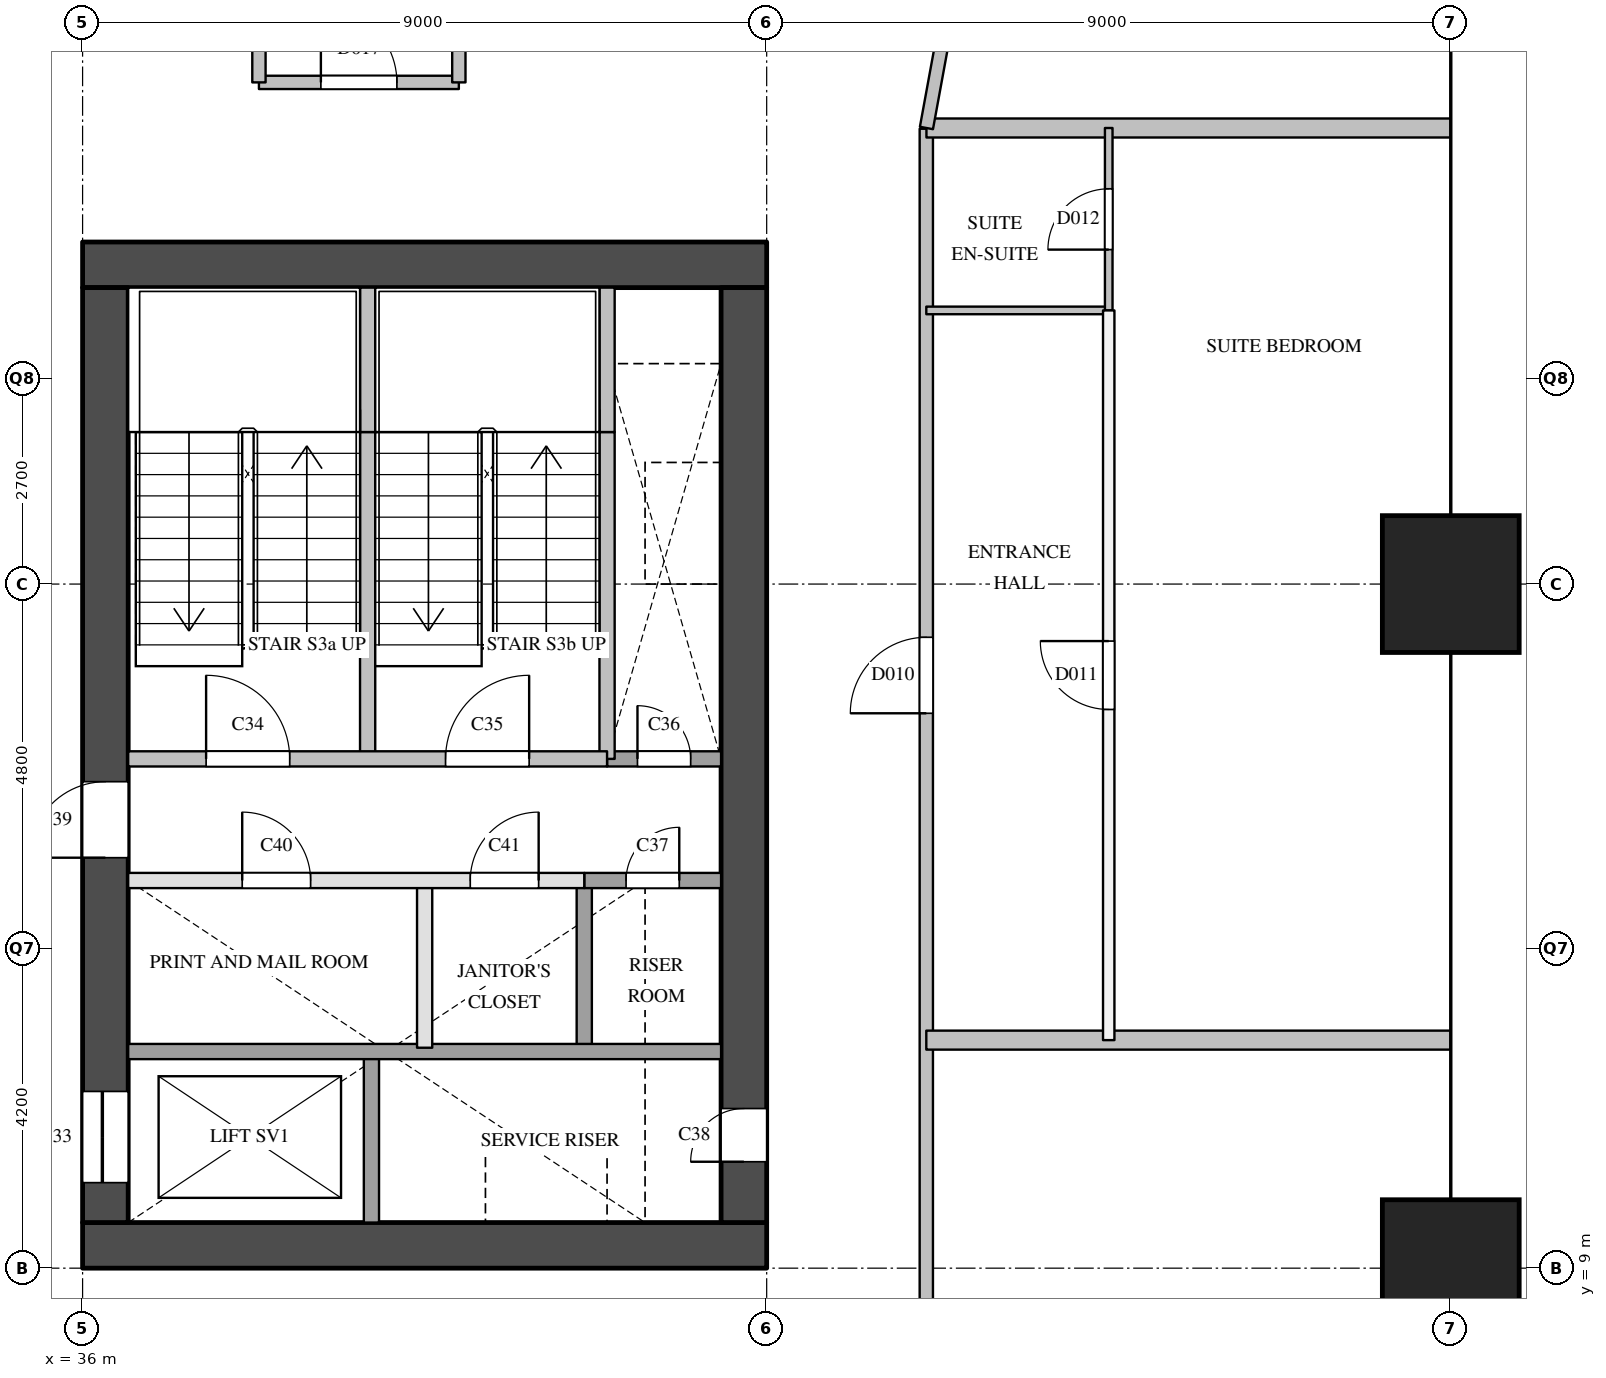
"""IFC4 building model, lengths in metres.
Left out: names, types, materials, properties, quantities, classifications, styles, units other than length and angle.
Written with IfcOpenShell. Run it as: python <this file> out.ifc"""

import sys

from ifc_helpers import new_model, si_unit, direction, frame, frame_2d, origin, origin_2d, place, context, subcontext, project, spatial, rectangle, extrude, element, fill, save


model = new_model("IFC4")
c1 = context("Model", 3, precision=1e-05, world=origin(), true_north=direction((0.0, 1.0)))
c2 = subcontext(c1, "Body", "Model", "MODEL_VIEW")
j1 = project(units=[si_unit("LENGTHUNIT", "METRE"), si_unit("PLANEANGLEUNIT", "RADIAN")], contexts=[c1])
p1 = place(None, origin())
s1 = spatial("IfcSite", under=j1, at=p1, CompositionType="ELEMENT")
p2 = place(p1, origin())
s2 = spatial("IfcBuilding", under=s1, at=p2, CompositionType="ELEMENT")
p3 = place(p2, frame((0.0, 0.0, 46.2)))
s3 = spatial("IfcBuildingStorey", under=s2, at=p3, CompositionType="ELEMENT", Elevation=46.2)
for number, where, z_axis, x_axis in (
    (1, (54.0, 9.0, 0.0), (0.0, 0.0, 1.0), (1.0, 0.0, 0.0)),
    (2, (54.0, 18.0, 0.0), (0.0, 0.0, 1.0), (1.0, 0.0, 0.0)),
):
    element("IfcColumn", number, at=place(p3, frame(where, z_axis=z_axis, x_axis=x_axis)), inside=s3, PredefinedType="COLUMN", context=c2, shape_type="SweptSolid", body=[
        extrude(rectangle(XDim=1.8, YDim=1.8, at=origin_2d()), origin(), (0.0, 0.0, 1.0), 3.8),
    ])
for number, where, z_axis, x_axis in (
    (3, (36.0, 9.3, 0.0), (0.0, 0.0, 1.0), (1.0, 0.0, 0.0)),
    (4, (36.0, 22.2, 0.0), (0.0, 0.0, 1.0), (1.0, 0.0, 0.0)),
):
    element("IfcWall", number, at=place(p3, frame(where, z_axis=z_axis, x_axis=x_axis)), inside=s3, PredefinedType="SHEAR", context=c2, shape_type="SweptSolid", body=[
        extrude(rectangle(XDim=9.0, YDim=0.6, at=frame_2d((4.5, 0.0))), origin(), (0.0, 0.0, 1.0), 3.5),
    ])
p4 = place(p3, frame((36.3, 9.6, 0.0), z_axis=(0.0, 0.0, 1.0), x_axis=(0.0, 1.0, 0.0)))
e5 = element("IfcWall", 5, at=p4, inside=s3, PredefinedType="SHEAR", context=c2, shape_type="SweptSolid", body=[
    extrude(rectangle(XDim=12.3, YDim=0.6, at=frame_2d((6.15, 0.0))), origin(), (0.0, 0.0, 1.0), 3.5),
])
p5 = place(p4, frame((0.525, 0.0, 0.0)))
e6 = element("IfcOpeningElement", 6, at=p5, cuts=e5, PredefinedType="OPENING", context=c2, shape_type="SweptSolid", body=[
    extrude(rectangle(XDim=1.2, YDim=2.1, at=frame_2d((0.6, 1.05))), frame((0.0, 0.31, 0.0), z_axis=(0.0, -1.0, 0.0), x_axis=(1.0, 0.0, 0.0)), (0.0, 0.0, 1.0), 0.62),
])
p6 = place(p4, frame((4.8, 0.0, 0.0)))
e7 = element("IfcOpeningElement", 7, at=p6, cuts=e5, PredefinedType="OPENING", context=c2, shape_type="SweptSolid", body=[
    extrude(rectangle(XDim=1.0, YDim=2.1, at=frame_2d((0.5, 1.05))), frame((0.0, 0.31, 0.0), z_axis=(0.0, -1.0, 0.0), x_axis=(1.0, 0.0, 0.0)), (0.0, 0.0, 1.0), 0.62),
])
p7 = place(p3, frame((44.7, 9.6, 0.0), z_axis=(0.0, 0.0, 1.0), x_axis=(0.0, 1.0, 0.0)))
e8 = element("IfcWall", 8, at=p7, inside=s3, PredefinedType="SHEAR", context=c2, shape_type="SweptSolid", body=[
    extrude(rectangle(XDim=12.3, YDim=0.6, at=frame_2d((6.15, 0.0))), origin(), (0.0, 0.0, 1.0), 3.5),
])
p8 = place(p7, frame((0.8, 0.0, 0.0)))
e9 = element("IfcOpeningElement", 9, at=p8, cuts=e8, PredefinedType="OPENING", context=c2, shape_type="SweptSolid", body=[
    extrude(rectangle(XDim=0.7, YDim=2.1, at=frame_2d((0.35, 1.05))), frame((0.0, 0.31, 0.0), z_axis=(0.0, -1.0, 0.0), x_axis=(1.0, 0.0, 0.0)), (0.0, 0.0, 1.0), 0.62),
])
p9 = place(p3, frame((39.75, 15.7, 0.0), z_axis=(0.0, 0.0, 1.0), x_axis=(0.0, 1.0, 0.0)))
e10 = element("IfcWall", 10, at=p9, inside=s3, PredefinedType="SOLIDWALL", context=c2, shape_type="SweptSolid", body=[
    extrude(rectangle(XDim=4.3, YDim=0.2, at=frame_2d((2.15, 0.0))), origin(), (0.0, 0.0, 1.0), 3.5),
])
p10 = place(p3, frame((39.75, 20.0, 0.0), z_axis=(0.0, 0.0, 1.0), x_axis=(0.0, 1.0, 0.0)))
e11 = element("IfcWall", 11, at=p10, inside=s3, PredefinedType="SOLIDWALL", context=c2, shape_type="SweptSolid", body=[
    extrude(rectangle(XDim=1.9, YDim=0.2, at=frame_2d((0.95, 0.0))), origin(), (0.0, 0.0, 1.0), 3.5),
])
p11 = place(p3, frame((39.8, 9.6, 0.0), z_axis=(0.0, 0.0, 1.0), x_axis=(0.0, 1.0, 0.0)))
e12 = element("IfcWall", 12, at=p11, inside=s3, PredefinedType="SOLIDWALL", context=c2, shape_type="SweptSolid", body=[
    extrude(rectangle(XDim=2.3, YDim=0.2, at=frame_2d((1.15, 0.0))), origin(), (0.0, 0.0, 1.0), 3.5),
])
p12 = place(p3, frame((40.5, 11.9, 0.0), z_axis=(0.0, 0.0, 1.0), x_axis=(0.0, 1.0, 0.0)))
e13 = element("IfcWall", 13, at=p12, inside=s3, PredefinedType="PARTITIONING", context=c2, shape_type="SweptSolid", body=[
    extrude(rectangle(XDim=2.2, YDim=0.2, at=frame_2d((1.1, 0.0))), origin(), (0.0, 0.0, 1.0), 3.5),
])
p13 = place(p3, frame((42.6, 11.9, 0.0), z_axis=(0.0, 0.0, 1.0), x_axis=(0.0, 1.0, 0.0)))
e14 = element("IfcWall", 14, at=p13, inside=s3, PredefinedType="SOLIDWALL", context=c2, shape_type="SweptSolid", body=[
    extrude(rectangle(XDim=2.2, YDim=0.2, at=frame_2d((1.1, 0.0))), origin(), (0.0, 0.0, 1.0), 3.5),
])
p14 = place(p3, frame((42.9, 15.7, 0.0), z_axis=(0.0, 0.0, 1.0), x_axis=(0.0, 1.0, 0.0)))
e15 = element("IfcWall", 15, at=p14, inside=s3, PredefinedType="SOLIDWALL", context=c2, shape_type="SweptSolid", body=[
    extrude(rectangle(XDim=4.3, YDim=0.2, at=frame_2d((2.15, 0.0))), origin(), (0.0, 0.0, 1.0), 3.5),
])
p15 = place(p3, frame((42.9, 20.0, 0.0), z_axis=(0.0, 0.0, 1.0), x_axis=(0.0, 1.0, 0.0)))
e16 = element("IfcWall", 16, at=p15, inside=s3, PredefinedType="SOLIDWALL", context=c2, shape_type="SweptSolid", body=[
    extrude(rectangle(XDim=1.9, YDim=0.2, at=frame_2d((0.95, 0.0))), origin(), (0.0, 0.0, 1.0), 3.5),
])
p16 = place(p3, frame((36.6, 11.85, 0.0), z_axis=(0.0, 0.0, 1.0), x_axis=(1.0, 0.0, 0.0)))
e17 = element("IfcWall", 17, at=p16, inside=s3, PredefinedType="SOLIDWALL", context=c2, shape_type="SweptSolid", body=[
    extrude(rectangle(XDim=7.8, YDim=0.2, at=frame_2d((3.9, 0.0))), origin(), (0.0, 0.0, 1.0), 3.5),
])
p17 = place(p3, frame((36.6, 14.1, 0.0), z_axis=(0.0, 0.0, 1.0), x_axis=(1.0, 0.0, 0.0)))
e18 = element("IfcWall", 18, at=p17, inside=s3, PredefinedType="PARTITIONING", context=c2, shape_type="SweptSolid", body=[
    extrude(rectangle(XDim=6.0, YDim=0.2, at=frame_2d((3.0, 0.0))), origin(), (0.0, 0.0, 1.0), 3.5),
])
p18 = place(p17, frame((1.5, 0.0, 0.0)))
e19 = element("IfcOpeningElement", 19, at=p18, cuts=e18, PredefinedType="OPENING", context=c2, shape_type="SweptSolid", body=[
    extrude(rectangle(XDim=0.9, YDim=2.1, at=frame_2d((0.45, 1.05))), frame((0.0, 0.11, 0.0), z_axis=(0.0, -1.0, 0.0), x_axis=(1.0, 0.0, 0.0)), (0.0, 0.0, 1.0), 0.22),
])
p19 = place(p17, frame((4.5, 0.0, 0.0)))
e20 = element("IfcOpeningElement", 20, at=p19, cuts=e18, PredefinedType="OPENING", context=c2, shape_type="SweptSolid", body=[
    extrude(rectangle(XDim=0.9, YDim=2.1, at=frame_2d((0.45, 1.05))), frame((0.0, 0.11, 0.0), z_axis=(0.0, -1.0, 0.0), x_axis=(1.0, 0.0, 0.0)), (0.0, 0.0, 1.0), 0.22),
])
p20 = place(p3, frame((42.6, 14.1, 0.0), z_axis=(0.0, 0.0, 1.0), x_axis=(1.0, 0.0, 0.0)))
e21 = element("IfcWall", 21, at=p20, inside=s3, PredefinedType="SOLIDWALL", context=c2, shape_type="SweptSolid", body=[
    extrude(rectangle(XDim=1.8, YDim=0.2, at=frame_2d((0.9, 0.0))), origin(), (0.0, 0.0, 1.0), 3.5),
])
p21 = place(p20, frame((0.55, 0.0, 0.0)))
e22 = element("IfcOpeningElement", 22, at=p21, cuts=e21, PredefinedType="OPENING", context=c2, shape_type="SweptSolid", body=[
    extrude(rectangle(XDim=0.7, YDim=2.1, at=frame_2d((0.35, 1.05))), frame((0.0, 0.11, 0.0), z_axis=(0.0, -1.0, 0.0), x_axis=(1.0, 0.0, 0.0)), (0.0, 0.0, 1.0), 0.22),
])
p22 = place(p3, frame((42.9, 15.7, 0.0), z_axis=(0.0, 0.0, 1.0), x_axis=(1.0, 0.0, 0.0)))
e23 = element("IfcWall", 23, at=p22, inside=s3, PredefinedType="SOLIDWALL", context=c2, shape_type="SweptSolid", body=[
    extrude(rectangle(XDim=1.5, YDim=0.2, at=frame_2d((0.75, 0.0))), origin(), (0.0, 0.0, 1.0), 3.5),
])
p23 = place(p22, frame((0.4, 0.0, 0.0)))
e24 = element("IfcOpeningElement", 24, at=p23, cuts=e23, PredefinedType="OPENING", context=c2, shape_type="SweptSolid", body=[
    extrude(rectangle(XDim=0.7, YDim=2.1, at=frame_2d((0.35, 1.05))), frame((0.0, 0.11, 0.0), z_axis=(0.0, -1.0, 0.0), x_axis=(1.0, 0.0, 0.0)), (0.0, 0.0, 1.0), 0.22),
])
p24 = place(p3, frame((36.6, 15.7, 0.0), z_axis=(0.0, 0.0, 1.0), x_axis=(1.0, 0.0, 0.0)))
e25 = element("IfcWall", 25, at=p24, inside=s3, PredefinedType="SOLIDWALL", context=c2, shape_type="SweptSolid", body=[
    extrude(rectangle(XDim=6.3, YDim=0.2, at=frame_2d((3.15, 0.0))), origin(), (0.0, 0.0, 1.0), 3.5),
])
p25 = place(p24, frame((1.025, 0.0, 0.0)))
e26 = element("IfcOpeningElement", 26, at=p25, cuts=e25, PredefinedType="OPENING", context=c2, shape_type="SweptSolid", body=[
    extrude(rectangle(XDim=1.1, YDim=2.1, at=frame_2d((0.55, 1.05))), frame((0.0, 0.11, 0.0), z_axis=(0.0, -1.0, 0.0), x_axis=(1.0, 0.0, 0.0)), (0.0, 0.0, 1.0), 0.22),
])
p26 = place(p24, frame((4.175, 0.0, 0.0)))
e27 = element("IfcOpeningElement", 27, at=p26, cuts=e25, PredefinedType="OPENING", context=c2, shape_type="SweptSolid", body=[
    extrude(rectangle(XDim=1.1, YDim=2.1, at=frame_2d((0.55, 1.05))), frame((0.0, 0.11, 0.0), z_axis=(0.0, -1.0, 0.0), x_axis=(1.0, 0.0, 0.0)), (0.0, 0.0, 1.0), 0.22),
])
p27 = place(p3, frame((38.32, 24.6, 0.0), z_axis=(0.0, 0.0, 1.0), x_axis=(1.0, 0.0, 0.0)))
e28 = element("IfcWall", 28, at=p27, inside=s3, PredefinedType="PARTITIONING", context=c2, shape_type="SweptSolid", body=[
    extrude(rectangle(XDim=2.63, YDim=0.175, at=frame_2d((1.315, 0.0))), origin(), (0.0, 0.0, 1.0), 3.5),
])
p28 = place(p27, frame((0.815, 0.0, 0.0)))
e29 = element("IfcOpeningElement", 29, at=p28, cuts=e28, PredefinedType="OPENING", context=c2, shape_type="SweptSolid", body=[
    extrude(rectangle(XDim=1.0, YDim=2.1, at=frame_2d((0.5, 1.05))), frame((0.0, 0.097, 0.0), z_axis=(0.0, -1.0, 0.0), x_axis=(1.0, 0.0, 0.0)), (0.0, 0.0, 1.0), 0.195),
])
for number, where, z_axis, x_axis in (
    (30, (38.32, 24.6, 0.0), (0.0, 0.0, 1.0), (0.0, 1.0, 0.0)),
    (31, (40.95, 24.6, 0.0), (0.0, 0.0, 1.0), (0.0, 1.0, 0.0)),
):
    element("IfcWall", number, at=place(p3, frame(where, z_axis=z_axis, x_axis=x_axis)), inside=s3, PredefinedType="PARTITIONING", context=c2, shape_type="SweptSolid", body=[
        extrude(rectangle(XDim=1.8, YDim=0.175, at=frame_2d((0.9, 0.0))), origin(), (0.0, 0.0, 1.0), 3.5),
    ])
p29 = place(p3, frame((47.1, 6.9, 0.0), z_axis=(0.0, 0.0, 1.0), x_axis=(0.0, 1.0, 0.0)))
e32 = element("IfcWall", 32, at=p29, inside=s3, PredefinedType="PARTITIONING", context=c2, shape_type="SweptSolid", body=[
    extrude(rectangle(XDim=17.09, YDim=0.175, at=frame_2d((8.545, 0.0))), origin(), (0.0, 0.0, 1.0), 3.5),
])
p30 = place(p29, frame((9.4, 0.0, 0.0)))
e33 = element("IfcOpeningElement", 33, at=p30, cuts=e32, PredefinedType="OPENING", context=c2, shape_type="SweptSolid", body=[
    extrude(rectangle(XDim=1.0, YDim=2.1, at=frame_2d((0.5, 1.05))), frame((0.0, 0.097, 0.0), z_axis=(0.0, -1.0, 0.0), x_axis=(1.0, 0.0, 0.0)), (0.0, 0.0, 1.0), 0.195),
])
p31 = place(p3, frame((49.5, 12.0, 0.0), z_axis=(0.0, 0.0, 1.0), x_axis=(0.0, 1.0, 0.0)))
e34 = element("IfcWall", 34, at=p31, inside=s3, PredefinedType="PARTITIONING", context=c2, shape_type="SweptSolid", body=[
    extrude(rectangle(XDim=9.6, YDim=0.15, at=frame_2d((4.8, 0.0))), origin(), (0.0, 0.0, 1.0), 3.5),
])
p32 = place(p31, frame((4.35, 0.0, 0.0)))
e35 = element("IfcOpeningElement", 35, at=p32, cuts=e34, PredefinedType="OPENING", context=c2, shape_type="SweptSolid", body=[
    extrude(rectangle(XDim=0.9, YDim=2.1, at=frame_2d((0.45, 1.05))), frame((0.0, 0.085, 0.0), z_axis=(0.0, -1.0, 0.0), x_axis=(1.0, 0.0, 0.0)), (0.0, 0.0, 1.0), 0.17),
])
p33 = place(p3, frame((47.1, 12.0, 0.0), z_axis=(0.0, 0.0, 1.0), x_axis=(1.0, 0.0, 0.0)))
e36 = element("IfcWall", 36, at=p33, inside=s3, PredefinedType="PARTITIONING", context=c2, shape_type="SweptSolid", body=[
    extrude(rectangle(XDim=6.9, YDim=0.25, at=frame_2d((3.45, 0.0))), origin(), (0.0, 0.0, 1.0), 2.5),
])
p34 = place(p3, frame((47.102, 24.0, 0.0), z_axis=(0.0, 0.0, 1.0), x_axis=(1.0, 0.0, 0.0)))
e37 = element("IfcWall", 37, at=p34, inside=s3, PredefinedType="PARTITIONING", context=c2, shape_type="SweptSolid", body=[
    extrude(rectangle(XDim=6.898, YDim=0.25, at=frame_2d((3.449, 0.0))), origin(), (0.0, 0.0, 1.0), 2.5),
])
p35 = place(p3, frame((47.1, 21.6, 0.0), z_axis=(0.0, 0.0, 1.0), x_axis=(1.0, 0.0, 0.0)))
e38 = element("IfcWall", 38, at=p35, inside=s3, PredefinedType="PARTITIONING", context=c2, shape_type="SweptSolid", body=[
    extrude(rectangle(XDim=2.4, YDim=0.1, at=frame_2d((1.2, 0.0))), origin(), (0.0, 0.0, 1.0), 3.5),
])
p36 = place(p3, frame((49.5, 21.6, 0.0), z_axis=(0.0, 0.0, 1.0), x_axis=(0.0, 1.0, 0.0)))
e39 = element("IfcWall", 39, at=p36, inside=s3, PredefinedType="PARTITIONING", context=c2, shape_type="SweptSolid", body=[
    extrude(rectangle(XDim=2.4, YDim=0.1, at=frame_2d((1.2, 0.0))), origin(), (0.0, 0.0, 1.0), 3.5),
])
p37 = place(p36, frame((0.8, 0.0, 0.0)))
e40 = element("IfcOpeningElement", 40, at=p37, cuts=e39, PredefinedType="OPENING", context=c2, shape_type="SweptSolid", body=[
    extrude(rectangle(XDim=0.8, YDim=2.1, at=frame_2d((0.4, 1.05))), frame((0.0, 0.06, 0.0), z_axis=(0.0, -1.0, 0.0), x_axis=(1.0, 0.0, 0.0)), (0.0, 0.0, 1.0), 0.12),
])
p38 = place(p3, frame((47.32, 25.19, 0.0), z_axis=(0.0, 0.0, 1.0), x_axis=(-0.180412472784, -0.983591042895, 0.0)))
e41 = element("IfcWall", 41, at=p38, inside=s3, PredefinedType="PARTITIONING", context=c2, shape_type="SweptSolid", body=[
    extrude(rectangle(XDim=1.21, YDim=0.175, at=frame_2d((0.605, 0.0))), origin(), (0.0, 0.0, 1.0), 3.5),
])
p39 = place(p5, origin())
e42 = element("IfcDoor", 42, at=p39, inside=s3, OperationType="SLIDING_TO_LEFT", PredefinedType="DOOR", context=c2, shape_type="SweptSolid", body=[
    extrude(rectangle(XDim=1.2, YDim=2.1, at=frame_2d((0.6, 1.05))), frame((0.0, 0.025, 0.0), z_axis=(0.0, -1.0, 0.0), x_axis=(1.0, 0.0, 0.0)), (0.0, 0.0, 1.0), 0.05),
])
fill(e6, e42)
p40 = place(p25, origin())
e43 = element("IfcDoor", 43, at=p40, inside=s3, OperationType="SINGLE_SWING_LEFT", PredefinedType="DOOR", context=c2, shape_type="SweptSolid", body=[
    extrude(rectangle(XDim=1.1, YDim=2.1, at=frame_2d((0.55, 1.05))), frame((0.0, 0.025, 0.0), z_axis=(0.0, -1.0, 0.0), x_axis=(1.0, 0.0, 0.0)), (0.0, 0.0, 1.0), 0.05),
])
fill(e26, e43)
p41 = place(p26, origin())
e44 = element("IfcDoor", 44, at=p41, inside=s3, OperationType="SINGLE_SWING_RIGHT", PredefinedType="DOOR", context=c2, shape_type="SweptSolid", body=[
    extrude(rectangle(XDim=1.1, YDim=2.1, at=frame_2d((0.55, 1.05))), frame((0.0, 0.025, 0.0), z_axis=(0.0, -1.0, 0.0), x_axis=(1.0, 0.0, 0.0)), (0.0, 0.0, 1.0), 0.05),
])
fill(e27, e44)
p42 = place(p23, origin())
e45 = element("IfcDoor", 45, at=p42, inside=s3, OperationType="SINGLE_SWING_LEFT", PredefinedType="DOOR", context=c2, shape_type="SweptSolid", body=[
    extrude(rectangle(XDim=0.7, YDim=2.1, at=frame_2d((0.35, 1.05))), frame((0.0, 0.025, 0.0), z_axis=(0.0, -1.0, 0.0), x_axis=(1.0, 0.0, 0.0)), (0.0, 0.0, 1.0), 0.05),
])
fill(e24, e45)
p43 = place(p21, origin())
e46 = element("IfcDoor", 46, at=p43, inside=s3, OperationType="SINGLE_SWING_RIGHT", PredefinedType="DOOR", context=c2, shape_type="SweptSolid", body=[
    extrude(rectangle(XDim=0.7, YDim=2.1, at=frame_2d((0.35, 1.05))), frame((0.0, 0.025, 0.0), z_axis=(0.0, -1.0, 0.0), x_axis=(1.0, 0.0, 0.0)), (0.0, 0.0, 1.0), 0.05),
])
fill(e22, e46)
p44 = place(p8, origin())
e47 = element("IfcDoor", 47, at=p44, inside=s3, OperationType="SINGLE_SWING_LEFT", PredefinedType="DOOR", context=c2, shape_type="SweptSolid", body=[
    extrude(rectangle(XDim=0.7, YDim=2.1, at=frame_2d((0.35, 1.05))), frame((0.0, 0.025, 0.0), z_axis=(0.0, -1.0, 0.0), x_axis=(1.0, 0.0, 0.0)), (0.0, 0.0, 1.0), 0.05),
])
fill(e9, e47)
p45 = place(p6, origin())
e48 = element("IfcDoor", 48, at=p45, inside=s3, OperationType="SINGLE_SWING_LEFT", PredefinedType="DOOR", context=c2, shape_type="SweptSolid", body=[
    extrude(rectangle(XDim=1.0, YDim=2.1, at=frame_2d((0.5, 1.05))), frame((0.0, 0.025, 0.0), z_axis=(0.0, -1.0, 0.0), x_axis=(1.0, 0.0, 0.0)), (0.0, 0.0, 1.0), 0.05),
])
fill(e7, e48)
p46 = place(p18, origin())
e49 = element("IfcDoor", 49, at=p46, inside=s3, OperationType="SINGLE_SWING_LEFT", PredefinedType="DOOR", context=c2, shape_type="SweptSolid", body=[
    extrude(rectangle(XDim=0.9, YDim=2.1, at=frame_2d((0.45, 1.05))), frame((0.0, 0.025, 0.0), z_axis=(0.0, -1.0, 0.0), x_axis=(1.0, 0.0, 0.0)), (0.0, 0.0, 1.0), 0.05),
])
fill(e19, e49)
p47 = place(p19, origin())
e50 = element("IfcDoor", 50, at=p47, inside=s3, OperationType="SINGLE_SWING_RIGHT", PredefinedType="DOOR", context=c2, shape_type="SweptSolid", body=[
    extrude(rectangle(XDim=0.9, YDim=2.1, at=frame_2d((0.45, 1.05))), frame((0.0, 0.025, 0.0), z_axis=(0.0, -1.0, 0.0), x_axis=(1.0, 0.0, 0.0)), (0.0, 0.0, 1.0), 0.05),
])
fill(e20, e50)
p48 = place(p30, origin())
e51 = element("IfcDoor", 51, at=p48, inside=s3, OperationType="SINGLE_SWING_LEFT", PredefinedType="DOOR", context=c2, shape_type="SweptSolid", body=[
    extrude(rectangle(XDim=1.0, YDim=2.1, at=frame_2d((0.5, 1.05))), frame((0.0, 0.025, 0.0), z_axis=(0.0, -1.0, 0.0), x_axis=(1.0, 0.0, 0.0)), (0.0, 0.0, 1.0), 0.05),
])
fill(e33, e51)
p49 = place(p32, origin())
e52 = element("IfcDoor", 52, at=p49, inside=s3, OperationType="SINGLE_SWING_RIGHT", PredefinedType="DOOR", context=c2, shape_type="SweptSolid", body=[
    extrude(rectangle(XDim=0.9, YDim=2.1, at=frame_2d((0.45, 1.05))), frame((0.0, 0.025, 0.0), z_axis=(0.0, -1.0, 0.0), x_axis=(1.0, 0.0, 0.0)), (0.0, 0.0, 1.0), 0.05),
])
fill(e35, e52)
p50 = place(p37, origin())
e53 = element("IfcDoor", 53, at=p50, inside=s3, OperationType="SINGLE_SWING_LEFT", PredefinedType="DOOR", context=c2, shape_type="SweptSolid", body=[
    extrude(rectangle(XDim=0.8, YDim=2.1, at=frame_2d((0.4, 1.05))), frame((0.0, 0.025, 0.0), z_axis=(0.0, -1.0, 0.0), x_axis=(1.0, 0.0, 0.0)), (0.0, 0.0, 1.0), 0.05),
])
fill(e40, e53)
p51 = place(p28, origin())
e54 = element("IfcDoor", 54, at=p51, inside=s3, OperationType="SINGLE_SWING_LEFT", PredefinedType="DOOR", context=c2, shape_type="SweptSolid", body=[
    extrude(rectangle(XDim=1.0, YDim=2.1, at=frame_2d((0.5, 1.05))), frame((0.0, 0.025, 0.0), z_axis=(0.0, -1.0, 0.0), x_axis=(1.0, 0.0, 0.0)), (0.0, 0.0, 1.0), 0.05),
])
fill(e29, e54)
save(model, sys.argv[1])
